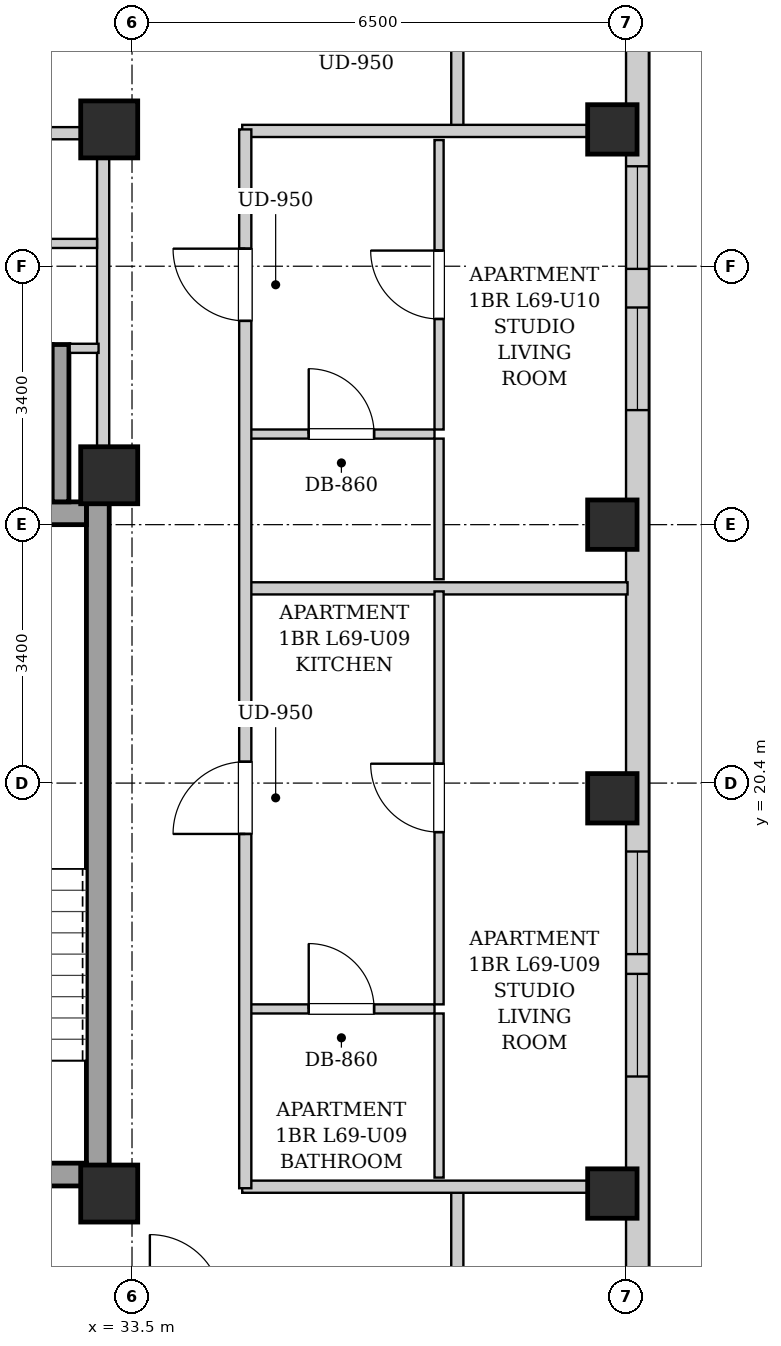
"""IFC4 building model, lengths in metres.
Left out: names, types, materials, properties, quantities, classifications, styles, units other than length and angle.
Written with IfcOpenShell. Run it as: python <this file> out.ifc"""

import sys

from ifc_helpers import new_model, si_unit, direction, frame, frame_2d, origin, origin_2d, place, context, subcontext, project, spatial, rectangle, extrude, element, fill, save


model = new_model("IFC4")
c1 = context("Model", 3, precision=1e-05, world=origin(), true_north=direction((0.0, 1.0)))
c2 = subcontext(c1, "Body", "Model", "MODEL_VIEW")
j1 = project(units=[si_unit("LENGTHUNIT", "METRE"), si_unit("PLANEANGLEUNIT", "RADIAN")], contexts=[c1])
p1 = place(None, origin())
s1 = spatial("IfcSite", under=j1, at=p1, CompositionType="ELEMENT")
p2 = place(p1, origin())
s2 = spatial("IfcBuilding", under=s1, at=p2, CompositionType="ELEMENT")
p3 = place(p2, frame((0.0, 0.0, 237.7)))
s3 = spatial("IfcBuildingStorey", under=s2, at=p3, CompositionType="ELEMENT", Elevation=237.7)
for number, where, z_axis, x_axis in (
    (1, (39.82, 15.0, 0.0), (0.0, 0.0, 1.0), (1.0, 0.0, 0.0)),
    (2, (39.82, 20.2, 0.0), (0.0, 0.0, 1.0), (1.0, 0.0, 0.0)),
    (3, (39.82, 23.8, 0.0), (0.0, 0.0, 1.0), (1.0, 0.0, 0.0)),
    (4, (39.82, 29.0, 0.0), (0.0, 0.0, 1.0), (1.0, 0.0, 0.0)),
):
    element("IfcColumn", number, at=place(p3, frame(where, z_axis=z_axis, x_axis=x_axis)), inside=s3, PredefinedType="COLUMN", context=c2, shape_type="SweptSolid", body=[
        extrude(rectangle(XDim=0.65, YDim=0.65, at=origin_2d()), origin(), (0.0, 0.0, 1.0), 3.4),
    ])
for number, where, z_axis, x_axis in (
    (5, (33.2, 15.0, 0.0), (0.0, 0.0, 1.0), (1.0, 0.0, 0.0)),
    (6, (33.2, 29.0, 0.0), (0.0, 0.0, 1.0), (1.0, 0.0, 0.0)),
    (7, (33.2, 24.45, 0.0), (0.0, 0.0, 1.0), (1.0, 0.0, 0.0)),
):
    element("IfcColumn", number, at=place(p3, frame(where, z_axis=z_axis, x_axis=x_axis)), inside=s3, PredefinedType="COLUMN", context=c2, shape_type="SweptSolid", body=[
        extrude(rectangle(XDim=0.75, YDim=0.75, at=origin_2d()), origin(), (0.0, 0.0, 1.0), 3.4),
    ])
p4 = place(p3, frame((40.15, 37.7, 0.0), z_axis=(0.0, 0.0, 1.0), x_axis=(0.0, -1.0, 0.0)))
e8 = element("IfcWall", 8, at=p4, inside=s3, PredefinedType="SOLIDWALL", context=c2, shape_type="SweptSolid", body=[
    extrude(rectangle(XDim=31.4, YDim=0.3, at=frame_2d((15.7, 0.0))), origin(), (0.0, 0.0, 1.0), 3.14),
])
p5 = place(p4, frame((28.546, 0.0, 0.55)))
e9 = element("IfcOpeningElement", 9, at=p5, cuts=e8, PredefinedType="OPENING", context=c2, shape_type="SweptSolid", body=[
    extrude(rectangle(XDim=1.35, YDim=1.2, at=frame_2d((0.675, 0.6))), frame((0.0, 0.16, 0.0), z_axis=(0.0, -1.0, 0.0), x_axis=(1.0, 0.0, 0.0)), (0.0, 0.0, 1.0), 0.32),
])
p6 = place(p4, frame((1.504, 0.0, 0.55)))
e10 = element("IfcOpeningElement", 10, at=p6, cuts=e8, PredefinedType="OPENING", context=c2, shape_type="SweptSolid", body=[
    extrude(rectangle(XDim=1.35, YDim=1.2, at=frame_2d((0.675, 0.6))), frame((0.0, 0.16, 0.0), z_axis=(0.0, -1.0, 0.0), x_axis=(1.0, 0.0, 0.0)), (0.0, 0.0, 1.0), 0.32),
])
p7 = place(p4, frame((18.2, 0.0, 0.55)))
e11 = element("IfcOpeningElement", 11, at=p7, cuts=e8, PredefinedType="OPENING", context=c2, shape_type="SweptSolid", body=[
    extrude(rectangle(XDim=1.35, YDim=1.2, at=frame_2d((0.675, 0.6))), frame((0.0, 0.16, 0.0), z_axis=(0.0, -1.0, 0.0), x_axis=(1.0, 0.0, 0.0)), (0.0, 0.0, 1.0), 0.32),
])
p8 = place(p4, frame((19.81, 0.0, 0.55)))
e12 = element("IfcOpeningElement", 12, at=p8, cuts=e8, PredefinedType="OPENING", context=c2, shape_type="SweptSolid", body=[
    extrude(rectangle(XDim=1.35, YDim=1.2, at=frame_2d((0.675, 0.6))), frame((0.0, 0.16, 0.0), z_axis=(0.0, -1.0, 0.0), x_axis=(1.0, 0.0, 0.0)), (0.0, 0.0, 1.0), 0.32),
])
p9 = place(p4, frame((11.043, 0.0, 0.55)))
e13 = element("IfcOpeningElement", 13, at=p9, cuts=e8, PredefinedType="OPENING", context=c2, shape_type="SweptSolid", body=[
    extrude(rectangle(XDim=1.35, YDim=1.2, at=frame_2d((0.675, 0.6))), frame((0.0, 0.16, 0.0), z_axis=(0.0, -1.0, 0.0), x_axis=(1.0, 0.0, 0.0)), (0.0, 0.0, 1.0), 0.32),
])
p10 = place(p4, frame((9.185, 0.0, 0.55)))
e14 = element("IfcOpeningElement", 14, at=p10, cuts=e8, PredefinedType="OPENING", context=c2, shape_type="SweptSolid", body=[
    extrude(rectangle(XDim=1.35, YDim=1.2, at=frame_2d((0.675, 0.6))), frame((0.0, 0.16, 0.0), z_axis=(0.0, -1.0, 0.0), x_axis=(1.0, 0.0, 0.0)), (0.0, 0.0, 1.0), 0.32),
])
p11 = place(p3, frame((33.05, 15.1, 0.0), z_axis=(0.0, 0.0, 1.0), x_axis=(0.0, 1.0, 0.0)))
e15 = element("IfcWall", 15, at=p11, inside=s3, PredefinedType="SHEAR", context=c2, shape_type="SweptSolid", body=[
    extrude(rectangle(XDim=9.0, YDim=0.3, at=frame_2d((4.5, 0.0))), origin(), (0.0, 0.0, 1.0), 3.14),
])
p12 = place(p3, frame((30.05, 23.95, 0.0), z_axis=(0.0, 0.0, 1.0), x_axis=(1.0, 0.0, 0.0)))
e16 = element("IfcWall", 16, at=p12, inside=s3, PredefinedType="SHEAR", context=c2, shape_type="SweptSolid", body=[
    extrude(rectangle(XDim=2.85, YDim=0.3, at=frame_2d((1.425, 0.0))), origin(), (0.0, 0.0, 1.0), 3.14),
])
p13 = place(p3, frame((30.05, 15.25, 0.0), z_axis=(0.0, 0.0, 1.0), x_axis=(1.0, 0.0, 0.0)))
e17 = element("IfcWall", 17, at=p13, inside=s3, PredefinedType="SHEAR", context=c2, shape_type="SweptSolid", body=[
    extrude(rectangle(XDim=2.85, YDim=0.3, at=frame_2d((1.425, 0.0))), origin(), (0.0, 0.0, 1.0), 3.14),
])
p14 = place(p13, frame((0.86, 0.0, 0.0)))
e18 = element("IfcOpeningElement", 18, at=p14, cuts=e17, PredefinedType="OPENING", context=c2, shape_type="SweptSolid", body=[
    extrude(rectangle(XDim=1.1, YDim=2.05, at=frame_2d((0.55, 1.025))), frame((0.0, 0.16, 0.0), z_axis=(0.0, -1.0, 0.0), x_axis=(1.0, 0.0, 0.0)), (0.0, 0.0, 1.0), 0.32),
])
p15 = place(p3, frame((32.56, 24.1, 0.0), z_axis=(0.0, 0.0, 1.0), x_axis=(0.0, 1.0, 0.0)))
e19 = element("IfcWall", 19, at=p15, inside=s3, PredefinedType="SHEAR", context=c2, shape_type="SweptSolid", body=[
    extrude(rectangle(XDim=2.07, YDim=0.22, at=frame_2d((1.035, 0.0))), origin(), (0.0, 0.0, 1.0), 3.14),
])
p16 = place(p3, frame((33.12, 24.12, 0.0), z_axis=(0.0, 0.0, 1.0), x_axis=(0.0, 1.0, 0.0)))
e20 = element("IfcWall", 20, at=p16, inside=s3, PredefinedType="PARTITIONING", context=c2, shape_type="SweptSolid", body=[
    extrude(rectangle(XDim=4.76, YDim=0.16, at=frame_2d((2.38, 0.0))), origin(), (0.0, 0.0, 1.0), 2.475),
])
p17 = place(p3, frame((32.68, 26.12, 0.0), z_axis=(0.0, 0.0, 1.0), x_axis=(1.0, 0.0, 0.0)))
e21 = element("IfcWall", 21, at=p17, inside=s3, PredefinedType="PARTITIONING", context=c2, shape_type="SweptSolid", body=[
    extrude(rectangle(XDim=0.38, YDim=0.12, at=frame_2d((0.19, 0.0))), origin(), (0.0, 0.0, 1.0), 3.14),
])
p18 = place(p3, frame((30.12, 27.5, 0.0), z_axis=(0.0, 0.0, 1.0), x_axis=(1.0, 0.0, 0.0)))
e22 = element("IfcWall", 22, at=p18, inside=s3, PredefinedType="PARTITIONING", context=c2, shape_type="SweptSolid", body=[
    extrude(rectangle(XDim=2.92, YDim=0.12, at=frame_2d((1.46, 0.0))), origin(), (0.0, 0.0, 1.0), 3.14),
])
p19 = place(p18, frame((0.97, 0.0, 0.0)))
e23 = element("IfcOpeningElement", 23, at=p19, cuts=e22, PredefinedType="OPENING", context=c2, shape_type="SweptSolid", body=[
    extrude(rectangle(XDim=0.86, YDim=2.05, at=frame_2d((0.43, 1.025))), frame((0.0, 0.07, 0.0), z_axis=(0.0, -1.0, 0.0), x_axis=(1.0, 0.0, 0.0)), (0.0, 0.0, 1.0), 0.14),
])
p20 = place(p3, frame((25.72, 28.95, 0.0), z_axis=(0.0, 0.0, 1.0), x_axis=(1.0, 0.0, 0.0)))
e24 = element("IfcWall", 24, at=p20, inside=s3, PredefinedType="PARTITIONING", context=c2, shape_type="SweptSolid", body=[
    extrude(rectangle(XDim=7.32, YDim=0.16, at=frame_2d((3.66, 0.0))), origin(), (0.0, 0.0, 1.0), 2.668),
])
p21 = place(p20, frame((1.27, 0.0, 0.0)))
e25 = element("IfcOpeningElement", 25, at=p21, cuts=e24, PredefinedType="OPENING", context=c2, shape_type="SweptSolid", body=[
    extrude(rectangle(XDim=0.86, YDim=2.05, at=frame_2d((0.43, 1.025))), frame((0.0, 0.09, 0.0), z_axis=(0.0, -1.0, 0.0), x_axis=(1.0, 0.0, 0.0)), (0.0, 0.0, 1.0), 0.18),
])
for number, where, z_axis, x_axis in (
    (26, (37.78, 13.51, 0.0), (0.0, 0.0, 1.0), (0.0, 1.0, 0.0)),
    (27, (37.78, 28.98, 0.0), (0.0, 0.0, 1.0), (0.0, 1.0, 0.0)),
):
    element("IfcWall", number, at=place(p3, frame(where, z_axis=z_axis, x_axis=x_axis)), inside=s3, PredefinedType="PARTITIONING", context=c2, shape_type="SweptSolid", body=[
        extrude(rectangle(XDim=1.58, YDim=0.16, at=frame_2d((0.79, 0.0))), origin(), (0.0, 0.0, 1.0), 3.14),
    ])
for number, where, z_axis, x_axis in (
    (28, (34.95, 15.09, 0.0), (0.0, 0.0, 1.0), (1.0, 0.0, 0.0)),
    (29, (34.95, 28.98, 0.0), (0.0, 0.0, 1.0), (1.0, 0.0, 0.0)),
):
    element("IfcWall", number, at=place(p3, frame(where, z_axis=z_axis, x_axis=x_axis)), inside=s3, PredefinedType="PARTITIONING", context=c2, shape_type="SweptSolid", body=[
        extrude(rectangle(XDim=5.07, YDim=0.16, at=frame_2d((2.535, 0.0))), origin(), (0.0, 0.0, 1.0), 2.668),
    ])
p22 = place(p3, frame((35.03, 22.962, 0.0), z_axis=(0.0, 0.0, 1.0), x_axis=(1.0, 0.0, 0.0)))
e30 = element("IfcWall", 30, at=p22, inside=s3, PredefinedType="PARTITIONING", context=c2, shape_type="SweptSolid", body=[
    extrude(rectangle(XDim=4.99, YDim=0.16, at=frame_2d((2.495, 0.0))), origin(), (0.0, 0.0, 1.0), 3.14),
])
p23 = place(p3, frame((35.03, 17.429, 0.0), z_axis=(0.0, 0.0, 1.0), x_axis=(1.0, 0.0, 0.0)))
e31 = element("IfcWall", 31, at=p23, inside=s3, PredefinedType="PARTITIONING", context=c2, shape_type="SweptSolid", body=[
    extrude(rectangle(XDim=2.45, YDim=0.12, at=frame_2d((1.225, 0.0))), origin(), (0.0, 0.0, 1.0), 3.14),
])
p24 = place(p23, frame((0.795, 0.0, 0.0)))
e32 = element("IfcOpeningElement", 32, at=p24, cuts=e31, PredefinedType="OPENING", context=c2, shape_type="SweptSolid", body=[
    extrude(rectangle(XDim=0.86, YDim=2.05, at=frame_2d((0.43, 1.025))), frame((0.0, 0.07, 0.0), z_axis=(0.0, -1.0, 0.0), x_axis=(1.0, 0.0, 0.0)), (0.0, 0.0, 1.0), 0.14),
])
p25 = place(p3, frame((37.54, 15.21, 0.0), z_axis=(0.0, 0.0, 1.0), x_axis=(0.0, 1.0, 0.0)))
e33 = element("IfcWall", 33, at=p25, inside=s3, PredefinedType="PARTITIONING", context=c2, shape_type="SweptSolid", body=[
    extrude(rectangle(XDim=2.159, YDim=0.12, at=frame_2d((1.08, 0.0))), origin(), (0.0, 0.0, 1.0), 3.14),
])
p26 = place(p3, frame((37.54, 17.489, 0.0), z_axis=(0.0, 0.0, 1.0), x_axis=(0.0, 1.0, 0.0)))
e34 = element("IfcWall", 34, at=p26, inside=s3, PredefinedType="PARTITIONING", context=c2, shape_type="SweptSolid", body=[
    extrude(rectangle(XDim=5.433, YDim=0.12, at=frame_2d((2.717, 0.0))), origin(), (0.0, 0.0, 1.0), 3.14),
])
p27 = place(p26, frame((2.266, 0.0, 0.0)))
e35 = element("IfcOpeningElement", 35, at=p27, cuts=e34, PredefinedType="OPENING", context=c2, shape_type="SweptSolid", body=[
    extrude(rectangle(XDim=0.9, YDim=2.05, at=frame_2d((0.45, 1.025))), frame((0.0, 0.07, 0.0), z_axis=(0.0, -1.0, 0.0), x_axis=(1.0, 0.0, 0.0)), (0.0, 0.0, 1.0), 0.14),
])
p28 = place(p3, frame((35.03, 24.992, 0.0), z_axis=(0.0, 0.0, 1.0), x_axis=(1.0, 0.0, 0.0)))
e36 = element("IfcWall", 36, at=p28, inside=s3, PredefinedType="PARTITIONING", context=c2, shape_type="SweptSolid", body=[
    extrude(rectangle(XDim=2.45, YDim=0.12, at=frame_2d((1.225, 0.0))), origin(), (0.0, 0.0, 1.0), 3.14),
])
p29 = place(p28, frame((0.795, 0.0, 0.0)))
e37 = element("IfcOpeningElement", 37, at=p29, cuts=e36, PredefinedType="OPENING", context=c2, shape_type="SweptSolid", body=[
    extrude(rectangle(XDim=0.86, YDim=2.05, at=frame_2d((0.43, 1.025))), frame((0.0, 0.07, 0.0), z_axis=(0.0, -1.0, 0.0), x_axis=(1.0, 0.0, 0.0)), (0.0, 0.0, 1.0), 0.14),
])
p30 = place(p3, frame((37.54, 23.082, 0.0), z_axis=(0.0, 0.0, 1.0), x_axis=(0.0, 1.0, 0.0)))
e38 = element("IfcWall", 38, at=p30, inside=s3, PredefinedType="PARTITIONING", context=c2, shape_type="SweptSolid", body=[
    extrude(rectangle(XDim=1.85, YDim=0.12, at=frame_2d((0.925, 0.0))), origin(), (0.0, 0.0, 1.0), 3.14),
])
p31 = place(p3, frame((37.54, 25.052, 0.0), z_axis=(0.0, 0.0, 1.0), x_axis=(0.0, 1.0, 0.0)))
e39 = element("IfcWall", 39, at=p31, inside=s3, PredefinedType="PARTITIONING", context=c2, shape_type="SweptSolid", body=[
    extrude(rectangle(XDim=3.808, YDim=0.12, at=frame_2d((1.904, 0.0))), origin(), (0.0, 0.0, 1.0), 3.14),
])
p32 = place(p31, frame((1.454, 0.0, 0.0)))
e40 = element("IfcOpeningElement", 40, at=p32, cuts=e39, PredefinedType="OPENING", context=c2, shape_type="SweptSolid", body=[
    extrude(rectangle(XDim=0.9, YDim=2.05, at=frame_2d((0.45, 1.025))), frame((0.0, 0.07, 0.0), z_axis=(0.0, -1.0, 0.0), x_axis=(1.0, 0.0, 0.0)), (0.0, 0.0, 1.0), 0.14),
])
p33 = place(p3, frame((34.99, 15.07, 0.0), z_axis=(0.0, 0.0, 1.0), x_axis=(0.0, 1.0, 0.0)))
e41 = element("IfcWall", 41, at=p33, inside=s3, PredefinedType="PARTITIONING", context=c2, shape_type="SweptSolid", body=[
    extrude(rectangle(XDim=13.93, YDim=0.16, at=frame_2d((6.965, 0.0))), origin(), (0.0, 0.0, 1.0), 3.14),
])
p34 = place(p33, frame((4.661, 0.0, 0.0)))
e42 = element("IfcOpeningElement", 42, at=p34, cuts=e41, PredefinedType="OPENING", context=c2, shape_type="SweptSolid", body=[
    extrude(rectangle(XDim=0.95, YDim=2.1, at=frame_2d((0.475, 1.05))), frame((0.0, 0.09, 0.0), z_axis=(0.0, -1.0, 0.0), x_axis=(1.0, 0.0, 0.0)), (0.0, 0.0, 1.0), 0.18),
])
p35 = place(p33, frame((11.411, 0.0, 0.0)))
e43 = element("IfcOpeningElement", 43, at=p35, cuts=e41, PredefinedType="OPENING", context=c2, shape_type="SweptSolid", body=[
    extrude(rectangle(XDim=0.95, YDim=2.1, at=frame_2d((0.475, 1.05))), frame((0.0, 0.09, 0.0), z_axis=(0.0, -1.0, 0.0), x_axis=(1.0, 0.0, 0.0)), (0.0, 0.0, 1.0), 0.18),
])
p36 = place(p24, origin())
e44 = element("IfcDoor", 44, at=p36, inside=s3, OperationType="SINGLE_SWING_LEFT", PredefinedType="DOOR", context=c2, shape_type="SweptSolid", body=[
    extrude(rectangle(XDim=0.86, YDim=2.05, at=frame_2d((0.43, 1.025))), frame((0.0, 0.025, 0.0), z_axis=(0.0, -1.0, 0.0), x_axis=(1.0, 0.0, 0.0)), (0.0, 0.0, 1.0), 0.05),
])
fill(e32, e44)
p37 = place(p27, origin())
e45 = element("IfcDoor", 45, at=p37, inside=s3, OperationType="SINGLE_SWING_RIGHT", PredefinedType="DOOR", context=c2, shape_type="SweptSolid", body=[
    extrude(rectangle(XDim=0.9, YDim=2.05, at=frame_2d((0.45, 1.025))), frame((0.0, 0.025, 0.0), z_axis=(0.0, -1.0, 0.0), x_axis=(1.0, 0.0, 0.0)), (0.0, 0.0, 1.0), 0.05),
])
fill(e35, e45)
p38 = place(p29, origin())
e46 = element("IfcDoor", 46, at=p38, inside=s3, OperationType="SINGLE_SWING_LEFT", PredefinedType="DOOR", context=c2, shape_type="SweptSolid", body=[
    extrude(rectangle(XDim=0.86, YDim=2.05, at=frame_2d((0.43, 1.025))), frame((0.0, 0.025, 0.0), z_axis=(0.0, -1.0, 0.0), x_axis=(1.0, 0.0, 0.0)), (0.0, 0.0, 1.0), 0.05),
])
fill(e37, e46)
p39 = place(p32, origin())
e47 = element("IfcDoor", 47, at=p39, inside=s3, OperationType="SINGLE_SWING_RIGHT", PredefinedType="DOOR", context=c2, shape_type="SweptSolid", body=[
    extrude(rectangle(XDim=0.9, YDim=2.05, at=frame_2d((0.45, 1.025))), frame((0.0, 0.025, 0.0), z_axis=(0.0, -1.0, 0.0), x_axis=(1.0, 0.0, 0.0)), (0.0, 0.0, 1.0), 0.05),
])
fill(e40, e47)
p40 = place(p34, origin())
e48 = element("IfcDoor", 48, at=p40, inside=s3, OperationType="SINGLE_SWING_LEFT", PredefinedType="DOOR", context=c2, shape_type="SweptSolid", body=[
    extrude(rectangle(XDim=0.95, YDim=2.1, at=frame_2d((0.475, 1.05))), frame((0.0, 0.025, 0.0), z_axis=(0.0, -1.0, 0.0), x_axis=(1.0, 0.0, 0.0)), (0.0, 0.0, 1.0), 0.05),
])
fill(e42, e48)
p41 = place(p35, origin())
e49 = element("IfcDoor", 49, at=p41, inside=s3, OperationType="SINGLE_SWING_RIGHT", PredefinedType="DOOR", context=c2, shape_type="SweptSolid", body=[
    extrude(rectangle(XDim=0.95, YDim=2.1, at=frame_2d((0.475, 1.05))), frame((0.0, 0.025, 0.0), z_axis=(0.0, -1.0, 0.0), x_axis=(1.0, 0.0, 0.0)), (0.0, 0.0, 1.0), 0.05),
])
fill(e43, e49)
p42 = place(p7, origin())
e50 = element("IfcWindow", 50, at=p42, inside=s3, PartitioningType="SINGLE_PANEL", PredefinedType="WINDOW", context=c2, shape_type="SweptSolid", body=[
    extrude(rectangle(XDim=1.35, YDim=1.2, at=frame_2d((0.675, 0.6))), frame((0.0, 0.03, 0.0), z_axis=(0.0, -1.0, 0.0), x_axis=(1.0, 0.0, 0.0)), (0.0, 0.0, 1.0), 0.06),
])
fill(e11, e50)
p43 = place(p8, origin())
e51 = element("IfcWindow", 51, at=p43, inside=s3, PartitioningType="SINGLE_PANEL", PredefinedType="WINDOW", context=c2, shape_type="SweptSolid", body=[
    extrude(rectangle(XDim=1.35, YDim=1.2, at=frame_2d((0.675, 0.6))), frame((0.0, 0.03, 0.0), z_axis=(0.0, -1.0, 0.0), x_axis=(1.0, 0.0, 0.0)), (0.0, 0.0, 1.0), 0.06),
])
fill(e12, e51)
p44 = place(p9, origin())
e52 = element("IfcWindow", 52, at=p44, inside=s3, PartitioningType="SINGLE_PANEL", PredefinedType="WINDOW", context=c2, shape_type="SweptSolid", body=[
    extrude(rectangle(XDim=1.35, YDim=1.2, at=frame_2d((0.675, 0.6))), frame((0.0, 0.03, 0.0), z_axis=(0.0, -1.0, 0.0), x_axis=(1.0, 0.0, 0.0)), (0.0, 0.0, 1.0), 0.06),
])
fill(e13, e52)
p45 = place(p10, origin())
e53 = element("IfcWindow", 53, at=p45, inside=s3, PartitioningType="SINGLE_PANEL", PredefinedType="WINDOW", context=c2, shape_type="SweptSolid", body=[
    extrude(rectangle(XDim=1.35, YDim=1.2, at=frame_2d((0.675, 0.6))), frame((0.0, 0.03, 0.0), z_axis=(0.0, -1.0, 0.0), x_axis=(1.0, 0.0, 0.0)), (0.0, 0.0, 1.0), 0.06),
])
fill(e14, e53)
save(model, sys.argv[1])
